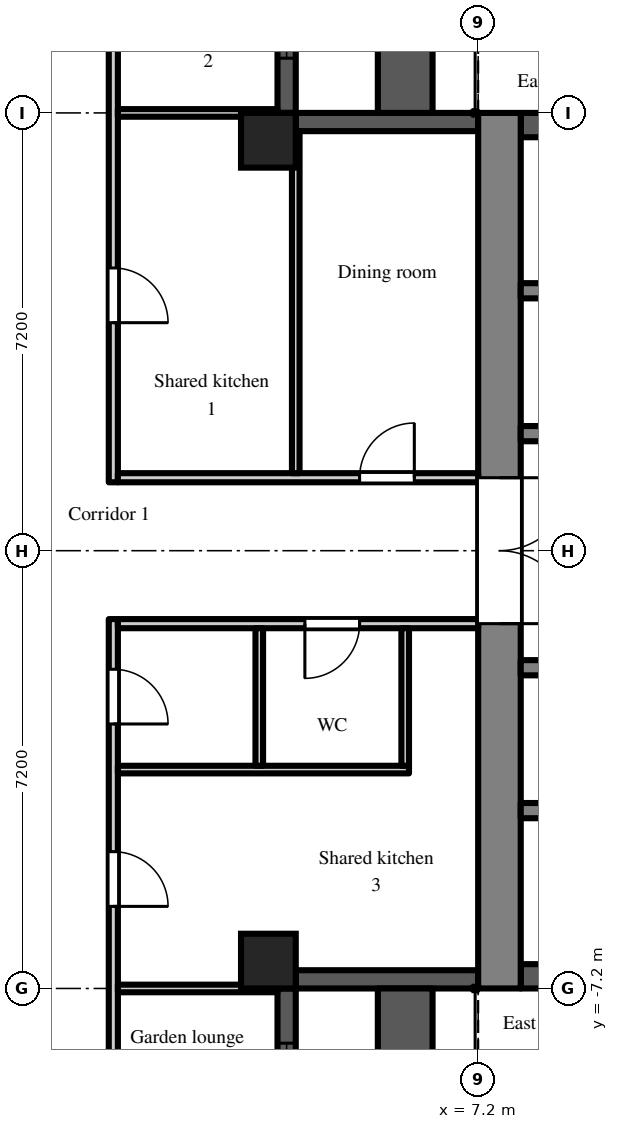
"""IFC4 building model, lengths in metres.
Left out: names, types, materials, properties, quantities, classifications, styles, units other than length and angle.
Written with IfcOpenShell. Run it as: python <this file> out.ifc"""

import sys

from ifc_helpers import new_model, si_unit, direction, frame, frame_2d, origin, origin_2d, place, context, subcontext, project, spatial, rectangle, extrude, element, fill, save


model = new_model("IFC4")
c1 = context("Model", 3, precision=1e-05, world=origin(), true_north=direction((0.0, 1.0)))
c2 = subcontext(c1, "Body", "Model", "MODEL_VIEW")
j1 = project(units=[si_unit("LENGTHUNIT", "METRE"), si_unit("PLANEANGLEUNIT", "RADIAN")], contexts=[c1])
p1 = place(None, origin())
s1 = spatial("IfcSite", under=j1, at=p1, CompositionType="ELEMENT")
p2 = place(p1, origin())
s2 = spatial("IfcBuilding", under=s1, at=p2, CompositionType="ELEMENT")
p3 = place(p2, frame((0.0, 0.0, 198.9)))
s3 = spatial("IfcBuildingStorey", under=s2, at=p3, CompositionType="ELEMENT", Elevation=198.9)
for number, where, z_axis, x_axis in (
    (1, (3.75, -6.75, 0.0), (0.0, 0.0, 1.0), (1.0, 0.0, 0.0)),
    (2, (3.75, 6.75, 0.0), (0.0, 0.0, 1.0), (1.0, 0.0, 0.0)),
):
    element("IfcColumn", number, at=place(p3, frame(where, z_axis=z_axis, x_axis=x_axis)), inside=s3, PredefinedType="COLUMN", context=c2, shape_type="SweptSolid", body=[
        extrude(rectangle(XDim=0.9, YDim=0.9, at=origin_2d()), origin(), (0.0, 0.0, 1.0), 3.0),
    ])
p4 = place(p3, frame((7.2, 7.05, 0.0), z_axis=(0.0, 0.0, 1.0), x_axis=(-1.0, 0.0, 0.0)))
e3 = element("IfcWall", 3, at=p4, inside=s3, PredefinedType="SOLIDWALL", context=c2, shape_type="SweptSolid", body=[
    extrude(rectangle(XDim=3.0, YDim=0.3, at=frame_2d((1.5, 0.0))), origin(), (0.0, 0.0, 1.0), 2.3),
])
p5 = place(p3, frame((4.05, 7.2, 0.0), z_axis=(0.0, 0.0, 1.0), x_axis=(0.0, 1.0, 0.0)))
e4 = element("IfcWall", 4, at=p5, inside=s3, PredefinedType="SOLIDWALL", context=c2, shape_type="SweptSolid", body=[
    extrude(rectangle(XDim=7.2, YDim=0.3, at=frame_2d((3.6, 0.0))), origin(), (0.0, 0.0, 1.0), 2.3),
])
p6 = place(p5, frame((3.0, 0.0, 0.0)))
e5 = element("IfcOpeningElement", 5, at=p6, cuts=e4, PredefinedType="OPENING", context=c2, shape_type="SweptSolid", body=[
    extrude(rectangle(XDim=1.2, YDim=2.05, at=frame_2d((0.6, 1.025))), frame((0.0, 0.16, 0.0), z_axis=(0.0, -1.0, 0.0), x_axis=(1.0, 0.0, 0.0)), (0.0, 0.0, 1.0), 0.32),
])
p7 = place(p5, frame((0.9, 0.0, 0.2)))
e6 = element("IfcOpeningElement", 6, at=p7, cuts=e4, PredefinedType="OPENING", context=c2, shape_type="SweptSolid", body=[
    extrude(rectangle(XDim=1.8, YDim=1.85, at=frame_2d((0.9, 0.925))), frame((0.0, 0.16, 0.0), z_axis=(0.0, -1.0, 0.0), x_axis=(1.0, 0.0, 0.0)), (0.0, 0.0, 1.0), 0.32),
])
p8 = place(p5, frame((4.5, 0.0, 0.2)))
e7 = element("IfcOpeningElement", 7, at=p8, cuts=e4, PredefinedType="OPENING", context=c2, shape_type="SweptSolid", body=[
    extrude(rectangle(XDim=1.8, YDim=1.85, at=frame_2d((0.9, 0.925))), frame((0.0, 0.16, 0.0), z_axis=(0.0, -1.0, 0.0), x_axis=(1.0, 0.0, 0.0)), (0.0, 0.0, 1.0), 0.32),
])
p9 = place(p3, frame((4.05, -14.4, 0.0), z_axis=(0.0, 0.0, 1.0), x_axis=(0.0, 1.0, 0.0)))
e8 = element("IfcWall", 8, at=p9, inside=s3, PredefinedType="SOLIDWALL", context=c2, shape_type="SweptSolid", body=[
    extrude(rectangle(XDim=7.2, YDim=0.3, at=frame_2d((3.6, 0.0))), origin(), (0.0, 0.0, 1.0), 2.3),
])
p10 = place(p9, frame((3.0, 0.0, 0.0)))
e9 = element("IfcOpeningElement", 9, at=p10, cuts=e8, PredefinedType="OPENING", context=c2, shape_type="SweptSolid", body=[
    extrude(rectangle(XDim=1.2, YDim=2.05, at=frame_2d((0.6, 1.025))), frame((0.0, 0.16, 0.0), z_axis=(0.0, -1.0, 0.0), x_axis=(1.0, 0.0, 0.0)), (0.0, 0.0, 1.0), 0.32),
])
p11 = place(p9, frame((0.9, 0.0, 0.2)))
e10 = element("IfcOpeningElement", 10, at=p11, cuts=e8, PredefinedType="OPENING", context=c2, shape_type="SweptSolid", body=[
    extrude(rectangle(XDim=1.8, YDim=1.85, at=frame_2d((0.9, 0.925))), frame((0.0, 0.16, 0.0), z_axis=(0.0, -1.0, 0.0), x_axis=(1.0, 0.0, 0.0)), (0.0, 0.0, 1.0), 0.32),
])
p12 = place(p9, frame((4.5, 0.0, 0.2)))
e11 = element("IfcOpeningElement", 11, at=p12, cuts=e8, PredefinedType="OPENING", context=c2, shape_type="SweptSolid", body=[
    extrude(rectangle(XDim=1.8, YDim=1.85, at=frame_2d((0.9, 0.925))), frame((0.0, 0.16, 0.0), z_axis=(0.0, -1.0, 0.0), x_axis=(1.0, 0.0, 0.0)), (0.0, 0.0, 1.0), 0.32),
])
p13 = place(p3, frame((4.2, -7.05, 0.0), z_axis=(0.0, 0.0, 1.0), x_axis=(1.0, 0.0, 0.0)))
e12 = element("IfcWall", 12, at=p13, inside=s3, PredefinedType="SOLIDWALL", context=c2, shape_type="SweptSolid", body=[
    extrude(rectangle(XDim=3.0, YDim=0.3, at=frame_2d((1.5, 0.0))), origin(), (0.0, 0.0, 1.0), 2.3),
])
for number, where, z_axis, x_axis in (
    (13, (6.0, 7.2, 0.0), (0.0, 0.0, 1.0), (0.0, 1.0, 0.0)),
    (14, (6.0, -14.4, 0.0), (0.0, 0.0, 1.0), (0.0, 1.0, 0.0)),
):
    element("IfcWall", number, at=place(p3, frame(where, z_axis=z_axis, x_axis=x_axis)), inside=s3, PredefinedType="PARAPET", context=c2, shape_type="SweptSolid", body=[
        extrude(rectangle(XDim=7.2, YDim=0.9, at=frame_2d((3.6, 0.0))), origin(), (0.0, 0.0, 1.0), 0.8),
    ])
p14 = place(p3, frame((7.55, -7.2, 0.0), z_axis=(0.0, 0.0, 1.0), x_axis=(0.0, 1.0, 0.0)))
e15 = element("IfcWall", 15, at=p14, inside=s3, PredefinedType="SHEAR", context=c2, shape_type="SweptSolid", body=[
    extrude(rectangle(XDim=14.4, YDim=0.7, at=frame_2d((7.2, 0.0))), origin(), (0.0, 0.0, 1.0), 2.6),
])
p15 = place(p14, frame((6.0, 0.0, 0.0)))
e16 = element("IfcOpeningElement", 16, at=p15, cuts=e15, PredefinedType="OPENING", context=c2, shape_type="SweptSolid", body=[
    extrude(rectangle(XDim=2.4, YDim=2.2, at=frame_2d((1.2, 1.1))), frame((0.0, 0.36, 0.0), z_axis=(0.0, -1.0, 0.0), x_axis=(1.0, 0.0, 0.0)), (0.0, 0.0, 1.0), 0.72),
])
p16 = place(p3, frame((7.9, 7.0, 0.0), z_axis=(0.0, 0.0, 1.0), x_axis=(1.0, 0.0, 0.0)))
e17 = element("IfcWall", 17, at=p16, inside=s3, PredefinedType="SHEAR", context=c2, shape_type="SweptSolid", body=[
    extrude(rectangle(XDim=12.95, YDim=0.4, at=frame_2d((6.475, 0.0))), origin(), (0.0, 0.0, 1.0), 2.6),
])
p17 = place(p3, frame((7.9, 1.925, 0.0), z_axis=(0.0, 0.0, 1.0), x_axis=(1.0, 0.0, 0.0)))
e18 = element("IfcWall", 18, at=p17, inside=s3, PredefinedType="SHEAR", context=c2, shape_type="SweptSolid", body=[
    extrude(rectangle(XDim=12.95, YDim=0.25, at=frame_2d((6.475, 0.0))), origin(), (0.0, 0.0, 1.0), 2.6),
])
p18 = place(p17, frame((4.825, 0.0, 0.0)))
e19 = element("IfcOpeningElement", 19, at=p18, cuts=e18, PredefinedType="OPENING", context=c2, shape_type="SweptSolid", body=[
    extrude(rectangle(XDim=1.1, YDim=2.1, at=frame_2d((0.55, 1.05))), frame((0.0, 0.135, 0.0), z_axis=(0.0, -1.0, 0.0), x_axis=(1.0, 0.0, 0.0)), (0.0, 0.0, 1.0), 0.27),
])
p19 = place(p17, frame((7.025, 0.0, 0.0)))
e20 = element("IfcOpeningElement", 20, at=p19, cuts=e18, PredefinedType="OPENING", context=c2, shape_type="SweptSolid", body=[
    extrude(rectangle(XDim=1.1, YDim=2.1, at=frame_2d((0.55, 1.05))), frame((0.0, 0.135, 0.0), z_axis=(0.0, -1.0, 0.0), x_axis=(1.0, 0.0, 0.0)), (0.0, 0.0, 1.0), 0.27),
])
p20 = place(p17, frame((9.225, 0.0, 0.0)))
e21 = element("IfcOpeningElement", 21, at=p20, cuts=e18, PredefinedType="OPENING", context=c2, shape_type="SweptSolid", body=[
    extrude(rectangle(XDim=1.1, YDim=2.1, at=frame_2d((0.55, 1.05))), frame((0.0, 0.135, 0.0), z_axis=(0.0, -1.0, 0.0), x_axis=(1.0, 0.0, 0.0)), (0.0, 0.0, 1.0), 0.27),
])
p21 = place(p17, frame((0.525, 0.0, 0.0)))
e22 = element("IfcOpeningElement", 22, at=p21, cuts=e18, PredefinedType="OPENING", context=c2, shape_type="SweptSolid", body=[
    extrude(rectangle(XDim=0.9, YDim=2.1, at=frame_2d((0.45, 1.05))), frame((0.0, 0.135, 0.0), z_axis=(0.0, -1.0, 0.0), x_axis=(1.0, 0.0, 0.0)), (0.0, 0.0, 1.0), 0.27),
])
p22 = place(p17, frame((2.625, 0.0, 0.0)))
e23 = element("IfcOpeningElement", 23, at=p22, cuts=e18, PredefinedType="OPENING", context=c2, shape_type="SweptSolid", body=[
    extrude(rectangle(XDim=1.1, YDim=2.1, at=frame_2d((0.55, 1.05))), frame((0.0, 0.135, 0.0), z_axis=(0.0, -1.0, 0.0), x_axis=(1.0, 0.0, 0.0)), (0.0, 0.0, 1.0), 0.27),
])
p23 = place(p17, frame((11.525, 0.0, 0.0)))
e24 = element("IfcOpeningElement", 24, at=p23, cuts=e18, PredefinedType="OPENING", context=c2, shape_type="SweptSolid", body=[
    extrude(rectangle(XDim=0.9, YDim=2.1, at=frame_2d((0.45, 1.05))), frame((0.0, 0.135, 0.0), z_axis=(0.0, -1.0, 0.0), x_axis=(1.0, 0.0, 0.0)), (0.0, 0.0, 1.0), 0.27),
])
p24 = place(p3, frame((7.9, 4.275, 0.0), z_axis=(0.0, 0.0, 1.0), x_axis=(1.0, 0.0, 0.0)))
e25 = element("IfcWall", 25, at=p24, inside=s3, PredefinedType="SHEAR", context=c2, shape_type="SweptSolid", body=[
    extrude(rectangle(XDim=1.95, YDim=0.25, at=frame_2d((0.975, 0.0))), origin(), (0.0, 0.0, 1.0), 2.6),
])
p25 = place(p3, frame((7.9, -7.0, 0.0), z_axis=(0.0, 0.0, 1.0), x_axis=(1.0, 0.0, 0.0)))
e26 = element("IfcWall", 26, at=p25, inside=s3, PredefinedType="SHEAR", context=c2, shape_type="SweptSolid", body=[
    extrude(rectangle(XDim=12.95, YDim=0.4, at=frame_2d((6.475, 0.0))), origin(), (0.0, 0.0, 1.0), 2.6),
])
p26 = place(p3, frame((7.9, -1.925, 0.0), z_axis=(0.0, 0.0, 1.0), x_axis=(1.0, 0.0, 0.0)))
e27 = element("IfcWall", 27, at=p26, inside=s3, PredefinedType="SHEAR", context=c2, shape_type="SweptSolid", body=[
    extrude(rectangle(XDim=12.95, YDim=0.25, at=frame_2d((6.475, 0.0))), origin(), (0.0, 0.0, 1.0), 2.6),
])
p27 = place(p26, frame((0.525, 0.0, 0.0)))
e28 = element("IfcOpeningElement", 28, at=p27, cuts=e27, PredefinedType="OPENING", context=c2, shape_type="SweptSolid", body=[
    extrude(rectangle(XDim=0.9, YDim=2.1, at=frame_2d((0.45, 1.05))), frame((0.0, 0.135, 0.0), z_axis=(0.0, -1.0, 0.0), x_axis=(1.0, 0.0, 0.0)), (0.0, 0.0, 1.0), 0.27),
])
p28 = place(p26, frame((2.625, 0.0, 0.0)))
e29 = element("IfcOpeningElement", 29, at=p28, cuts=e27, PredefinedType="OPENING", context=c2, shape_type="SweptSolid", body=[
    extrude(rectangle(XDim=1.1, YDim=2.1, at=frame_2d((0.55, 1.05))), frame((0.0, 0.135, 0.0), z_axis=(0.0, -1.0, 0.0), x_axis=(1.0, 0.0, 0.0)), (0.0, 0.0, 1.0), 0.27),
])
p29 = place(p26, frame((6.025, 0.0, 0.0)))
e30 = element("IfcOpeningElement", 30, at=p29, cuts=e27, PredefinedType="OPENING", context=c2, shape_type="SweptSolid", body=[
    extrude(rectangle(XDim=0.9, YDim=2.1, at=frame_2d((0.45, 1.05))), frame((0.0, 0.135, 0.0), z_axis=(0.0, -1.0, 0.0), x_axis=(1.0, 0.0, 0.0)), (0.0, 0.0, 1.0), 0.27),
])
p30 = place(p26, frame((10.425, 0.0, 0.0)))
e31 = element("IfcOpeningElement", 31, at=p30, cuts=e27, PredefinedType="OPENING", context=c2, shape_type="SweptSolid", body=[
    extrude(rectangle(XDim=0.9, YDim=2.1, at=frame_2d((0.45, 1.05))), frame((0.0, 0.135, 0.0), z_axis=(0.0, -1.0, 0.0), x_axis=(1.0, 0.0, 0.0)), (0.0, 0.0, 1.0), 0.27),
])
p31 = place(p3, frame((7.9, -4.275, 0.0), z_axis=(0.0, 0.0, 1.0), x_axis=(1.0, 0.0, 0.0)))
e32 = element("IfcWall", 32, at=p31, inside=s3, PredefinedType="SHEAR", context=c2, shape_type="SweptSolid", body=[
    extrude(rectangle(XDim=1.95, YDim=0.25, at=frame_2d((0.975, 0.0))), origin(), (0.0, 0.0, 1.0), 2.6),
])
p32 = place(p3, frame((1.2, -17.925, 0.0), z_axis=(0.0, 0.0, 1.0), x_axis=(0.0, 1.0, 0.0)))
e33 = element("IfcWall", 33, at=p32, inside=s3, PredefinedType="PARTITIONING", context=c2, shape_type="SweptSolid", body=[
    extrude(rectangle(XDim=16.8, YDim=0.15, at=frame_2d((8.4, 0.0))), origin(), (0.0, 0.0, 1.0), 2.6),
])
p33 = place(p32, frame((15.075, 0.0, 0.0)))
e34 = element("IfcOpeningElement", 34, at=p33, cuts=e33, PredefinedType="OPENING", context=c2, shape_type="SweptSolid", body=[
    extrude(rectangle(XDim=0.9, YDim=2.1, at=frame_2d((0.45, 1.05))), frame((0.0, 0.085, 0.0), z_axis=(0.0, -1.0, 0.0), x_axis=(1.0, 0.0, 0.0)), (0.0, 0.0, 1.0), 0.17),
])
p34 = place(p32, frame((12.075, 0.0, 0.0)))
e35 = element("IfcOpeningElement", 35, at=p34, cuts=e33, PredefinedType="OPENING", context=c2, shape_type="SweptSolid", body=[
    extrude(rectangle(XDim=0.9, YDim=2.1, at=frame_2d((0.45, 1.05))), frame((0.0, 0.085, 0.0), z_axis=(0.0, -1.0, 0.0), x_axis=(1.0, 0.0, 0.0)), (0.0, 0.0, 1.0), 0.17),
])
p35 = place(p32, frame((4.875, 0.0, 0.0)))
e36 = element("IfcOpeningElement", 36, at=p35, cuts=e33, PredefinedType="OPENING", context=c2, shape_type="SweptSolid", body=[
    extrude(rectangle(XDim=0.9, YDim=2.1, at=frame_2d((0.45, 1.05))), frame((0.0, 0.085, 0.0), z_axis=(0.0, -1.0, 0.0), x_axis=(1.0, 0.0, 0.0)), (0.0, 0.0, 1.0), 0.17),
])
p36 = place(p32, frame((1.925, 0.0, 0.0)))
e37 = element("IfcOpeningElement", 37, at=p36, cuts=e33, PredefinedType="OPENING", context=c2, shape_type="SweptSolid", body=[
    extrude(rectangle(XDim=1.0, YDim=2.1, at=frame_2d((0.5, 1.05))), frame((0.0, 0.085, 0.0), z_axis=(0.0, -1.0, 0.0), x_axis=(1.0, 0.0, 0.0)), (0.0, 0.0, 1.0), 0.17),
])
p37 = place(p3, frame((1.275, -7.2, 0.0), z_axis=(0.0, 0.0, 1.0), x_axis=(1.0, 0.0, 0.0)))
e38 = element("IfcWall", 38, at=p37, inside=s3, PredefinedType="PARTITIONING", context=c2, shape_type="SweptSolid", body=[
    extrude(rectangle(XDim=2.625, YDim=0.125, at=frame_2d((1.312, 0.0))), origin(), (0.0, 0.0, 1.0), 2.6),
])
p38 = place(p3, frame((1.275, -3.6, 0.0), z_axis=(0.0, 0.0, 1.0), x_axis=(1.0, 0.0, 0.0)))
e39 = element("IfcWall", 39, at=p38, inside=s3, PredefinedType="PARTITIONING", context=c2, shape_type="SweptSolid", body=[
    extrude(rectangle(XDim=4.788, YDim=0.125, at=frame_2d((2.394, 0.0))), origin(), (0.0, 0.0, 1.0), 2.6),
])
p39 = place(p3, frame((1.275, -1.2, 0.0), z_axis=(0.0, 0.0, 1.0), x_axis=(1.0, 0.0, 0.0)))
e40 = element("IfcWall", 40, at=p39, inside=s3, PredefinedType="PARTITIONING", context=c2, shape_type="SweptSolid", body=[
    extrude(rectangle(XDim=5.925, YDim=0.15, at=frame_2d((2.962, 0.0))), origin(), (0.0, 0.0, 1.0), 2.6),
])
p40 = place(p39, frame((3.075, 0.0, 0.0)))
e41 = element("IfcOpeningElement", 41, at=p40, cuts=e40, PredefinedType="OPENING", context=c2, shape_type="SweptSolid", body=[
    extrude(rectangle(XDim=0.9, YDim=2.1, at=frame_2d((0.45, 1.05))), frame((0.0, 0.085, 0.0), z_axis=(0.0, -1.0, 0.0), x_axis=(1.0, 0.0, 0.0)), (0.0, 0.0, 1.0), 0.17),
])
p41 = place(p3, frame((1.2, 1.125, 0.0), z_axis=(0.0, 0.0, 1.0), x_axis=(0.0, 1.0, 0.0)))
e42 = element("IfcWall", 42, at=p41, inside=s3, PredefinedType="PARTITIONING", context=c2, shape_type="SweptSolid", body=[
    extrude(rectangle(XDim=16.8, YDim=0.15, at=frame_2d((8.4, 0.0))), origin(), (0.0, 0.0, 1.0), 2.6),
])
p42 = place(p41, frame((2.625, 0.0, 0.0)))
e43 = element("IfcOpeningElement", 43, at=p42, cuts=e42, PredefinedType="OPENING", context=c2, shape_type="SweptSolid", body=[
    extrude(rectangle(XDim=0.9, YDim=2.1, at=frame_2d((0.45, 1.05))), frame((0.0, 0.085, 0.0), z_axis=(0.0, -1.0, 0.0), x_axis=(1.0, 0.0, 0.0)), (0.0, 0.0, 1.0), 0.17),
])
p43 = place(p41, frame((11.425, 0.0, 0.0)))
e44 = element("IfcOpeningElement", 44, at=p43, cuts=e42, PredefinedType="OPENING", context=c2, shape_type="SweptSolid", body=[
    extrude(rectangle(XDim=0.9, YDim=2.1, at=frame_2d((0.45, 1.05))), frame((0.0, 0.085, 0.0), z_axis=(0.0, -1.0, 0.0), x_axis=(1.0, 0.0, 0.0)), (0.0, 0.0, 1.0), 0.17),
])
p44 = place(p41, frame((7.825, 0.0, 0.0)))
e45 = element("IfcOpeningElement", 45, at=p44, cuts=e42, PredefinedType="OPENING", context=c2, shape_type="SweptSolid", body=[
    extrude(rectangle(XDim=0.9, YDim=2.1, at=frame_2d((0.45, 1.05))), frame((0.0, 0.085, 0.0), z_axis=(0.0, -1.0, 0.0), x_axis=(1.0, 0.0, 0.0)), (0.0, 0.0, 1.0), 0.17),
])
p45 = place(p41, frame((14.175, 0.0, 0.0)))
e46 = element("IfcOpeningElement", 46, at=p45, cuts=e42, PredefinedType="OPENING", context=c2, shape_type="SweptSolid", body=[
    extrude(rectangle(XDim=1.8, YDim=2.1, at=frame_2d((0.9, 1.05))), frame((0.0, 0.085, 0.0), z_axis=(0.0, -1.0, 0.0), x_axis=(1.0, 0.0, 0.0)), (0.0, 0.0, 1.0), 0.17),
])
p46 = place(p3, frame((1.275, 1.2, 0.0), z_axis=(0.0, 0.0, 1.0), x_axis=(1.0, 0.0, 0.0)))
e47 = element("IfcWall", 47, at=p46, inside=s3, PredefinedType="PARTITIONING", context=c2, shape_type="SweptSolid", body=[
    extrude(rectangle(XDim=5.925, YDim=0.15, at=frame_2d((2.962, 0.0))), origin(), (0.0, 0.0, 1.0), 2.6),
])
p47 = place(p46, frame((3.975, 0.0, 0.0)))
e48 = element("IfcOpeningElement", 48, at=p47, cuts=e47, PredefinedType="OPENING", context=c2, shape_type="SweptSolid", body=[
    extrude(rectangle(XDim=0.9, YDim=2.1, at=frame_2d((0.45, 1.05))), frame((0.0, 0.085, 0.0), z_axis=(0.0, -1.0, 0.0), x_axis=(1.0, 0.0, 0.0)), (0.0, 0.0, 1.0), 0.17),
])
p48 = place(p3, frame((1.275, 7.2, 0.0), z_axis=(0.0, 0.0, 1.0), x_axis=(1.0, 0.0, 0.0)))
e49 = element("IfcWall", 49, at=p48, inside=s3, PredefinedType="PARTITIONING", context=c2, shape_type="SweptSolid", body=[
    extrude(rectangle(XDim=2.625, YDim=0.125, at=frame_2d((1.312, 0.0))), origin(), (0.0, 0.0, 1.0), 2.6),
])
p49 = place(p3, frame((3.6, -3.538, 0.0), z_axis=(0.0, 0.0, 1.0), x_axis=(0.0, 1.0, 0.0)))
e50 = element("IfcWall", 50, at=p49, inside=s3, PredefinedType="PARTITIONING", context=c2, shape_type="SweptSolid", body=[
    extrude(rectangle(XDim=2.263, YDim=0.125, at=frame_2d((1.131, 0.0))), origin(), (0.0, 0.0, 1.0), 2.6),
])
p50 = place(p3, frame((4.2, 1.275, 0.0), z_axis=(0.0, 0.0, 1.0), x_axis=(0.0, 1.0, 0.0)))
e51 = element("IfcWall", 51, at=p50, inside=s3, PredefinedType="PARTITIONING", context=c2, shape_type="SweptSolid", body=[
    extrude(rectangle(XDim=5.625, YDim=0.125, at=frame_2d((2.812, 0.0))), origin(), (0.0, 0.0, 1.0), 2.6),
])
p51 = place(p3, frame((6.0, -3.538, 0.0), z_axis=(0.0, 0.0, 1.0), x_axis=(0.0, 1.0, 0.0)))
e52 = element("IfcWall", 52, at=p51, inside=s3, PredefinedType="PARTITIONING", context=c2, shape_type="SweptSolid", body=[
    extrude(rectangle(XDim=2.263, YDim=0.125, at=frame_2d((1.131, 0.0))), origin(), (0.0, 0.0, 1.0), 2.6),
])
p52 = place(p7, origin())
e53 = element("IfcWindow", 53, at=p52, inside=s3, PartitioningType="SINGLE_PANEL", PredefinedType="WINDOW", context=c2, shape_type="SweptSolid", body=[
    extrude(rectangle(XDim=1.8, YDim=1.85, at=frame_2d((0.9, 0.925))), frame((0.0, 0.03, 0.0), z_axis=(0.0, -1.0, 0.0), x_axis=(1.0, 0.0, 0.0)), (0.0, 0.0, 1.0), 0.06),
])
fill(e6, e53)
p53 = place(p12, origin())
e54 = element("IfcWindow", 54, at=p53, inside=s3, PartitioningType="SINGLE_PANEL", PredefinedType="WINDOW", context=c2, shape_type="SweptSolid", body=[
    extrude(rectangle(XDim=1.8, YDim=1.85, at=frame_2d((0.9, 0.925))), frame((0.0, 0.03, 0.0), z_axis=(0.0, -1.0, 0.0), x_axis=(1.0, 0.0, 0.0)), (0.0, 0.0, 1.0), 0.06),
])
fill(e11, e54)
p54 = place(p15, frame((2.4, 0.0, 0.0), z_axis=(0.0, 0.0, 1.0), x_axis=(-1.0, 0.0, 0.0)))
e55 = element("IfcDoor", 55, at=p54, inside=s3, OperationType="DOUBLE_DOOR_DOUBLE_SWING", PredefinedType="DOOR", context=c2, shape_type="SweptSolid", body=[
    extrude(rectangle(XDim=2.4, YDim=2.2, at=frame_2d((1.2, 1.1))), frame((0.0, 0.025, 0.0), z_axis=(0.0, -1.0, 0.0), x_axis=(1.0, 0.0, 0.0)), (0.0, 0.0, 1.0), 0.05),
])
fill(e16, e55)
p55 = place(p42, frame((0.9, 0.0, 0.0), z_axis=(0.0, 0.0, 1.0), x_axis=(-1.0, 0.0, 0.0)))
e56 = element("IfcDoor", 56, at=p55, inside=s3, OperationType="SINGLE_SWING_RIGHT", PredefinedType="DOOR", context=c2, shape_type="SweptSolid", body=[
    extrude(rectangle(XDim=0.9, YDim=2.1, at=frame_2d((0.45, 1.05))), frame((0.0, 0.025, 0.0), z_axis=(0.0, -1.0, 0.0), x_axis=(1.0, 0.0, 0.0)), (0.0, 0.0, 1.0), 0.05),
])
fill(e43, e56)
p56 = place(p47, origin())
e57 = element("IfcDoor", 57, at=p56, inside=s3, OperationType="SINGLE_SWING_RIGHT", PredefinedType="DOOR", context=c2, shape_type="SweptSolid", body=[
    extrude(rectangle(XDim=0.9, YDim=2.1, at=frame_2d((0.45, 1.05))), frame((0.0, 0.025, 0.0), z_axis=(0.0, -1.0, 0.0), x_axis=(1.0, 0.0, 0.0)), (0.0, 0.0, 1.0), 0.05),
])
fill(e48, e57)
p57 = place(p33, frame((0.9, 0.0, 0.0), z_axis=(0.0, 0.0, 1.0), x_axis=(-1.0, 0.0, 0.0)))
e58 = element("IfcDoor", 58, at=p57, inside=s3, OperationType="SINGLE_SWING_RIGHT", PredefinedType="DOOR", context=c2, shape_type="SweptSolid", body=[
    extrude(rectangle(XDim=0.9, YDim=2.1, at=frame_2d((0.45, 1.05))), frame((0.0, 0.025, 0.0), z_axis=(0.0, -1.0, 0.0), x_axis=(1.0, 0.0, 0.0)), (0.0, 0.0, 1.0), 0.05),
])
fill(e34, e58)
p58 = place(p40, frame((0.9, 0.0, 0.0), z_axis=(0.0, 0.0, 1.0), x_axis=(-1.0, 0.0, 0.0)))
e59 = element("IfcDoor", 59, at=p58, inside=s3, OperationType="SINGLE_SWING_RIGHT", PredefinedType="DOOR", context=c2, shape_type="SweptSolid", body=[
    extrude(rectangle(XDim=0.9, YDim=2.1, at=frame_2d((0.45, 1.05))), frame((0.0, 0.025, 0.0), z_axis=(0.0, -1.0, 0.0), x_axis=(1.0, 0.0, 0.0)), (0.0, 0.0, 1.0), 0.05),
])
fill(e41, e59)
p59 = place(p34, frame((0.9, 0.0, 0.0), z_axis=(0.0, 0.0, 1.0), x_axis=(-1.0, 0.0, 0.0)))
e60 = element("IfcDoor", 60, at=p59, inside=s3, OperationType="SINGLE_SWING_RIGHT", PredefinedType="DOOR", context=c2, shape_type="SweptSolid", body=[
    extrude(rectangle(XDim=0.9, YDim=2.1, at=frame_2d((0.45, 1.05))), frame((0.0, 0.025, 0.0), z_axis=(0.0, -1.0, 0.0), x_axis=(1.0, 0.0, 0.0)), (0.0, 0.0, 1.0), 0.05),
])
fill(e35, e60)
save(model, sys.argv[1])
